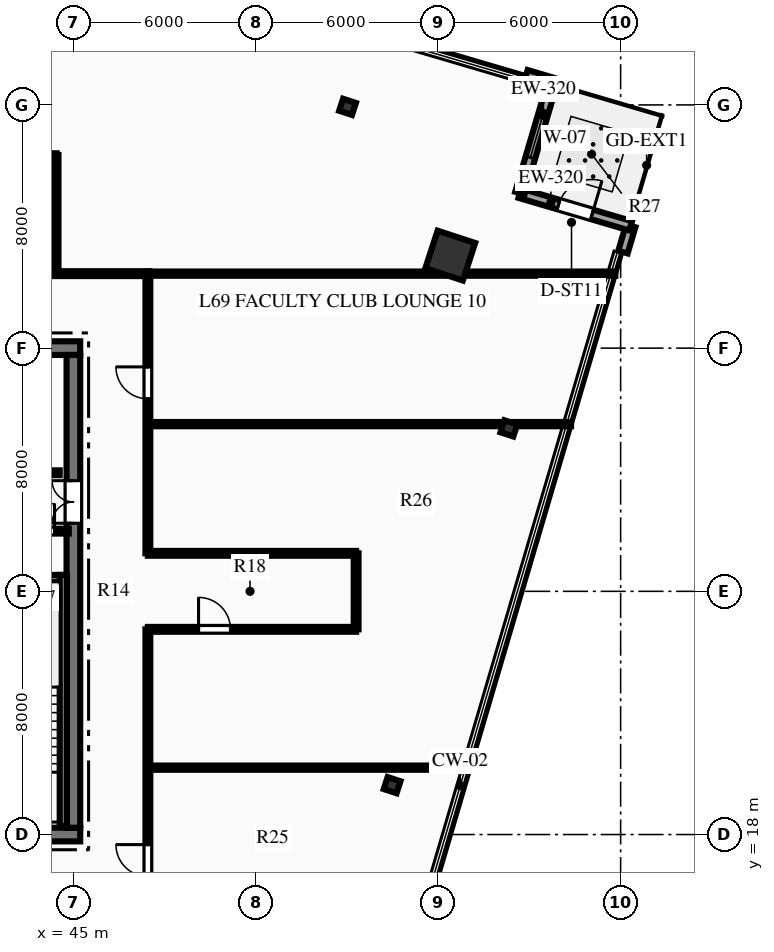
"""IFC4 building model, lengths in metres.
Left out: names, types, materials, properties, quantities, classifications, styles, units other than length and angle.
Written with IfcOpenShell. Run it as: python <this file> out.ifc"""

import sys

from ifc_helpers import new_model, si_unit, direction, frame, frame_2d, origin, origin_2d, place, context, subcontext, project, spatial, rectangle, hollow_rectangle, i_section, extrude, element, fill, save


model = new_model("IFC4")
c1 = context("Model", 3, precision=1e-05, world=origin(), true_north=direction((0.0, 1.0)))
c2 = subcontext(c1, "Body", "Model", "MODEL_VIEW")
j1 = project(units=[si_unit("LENGTHUNIT", "METRE"), si_unit("PLANEANGLEUNIT", "RADIAN")], contexts=[c1])
p1 = place(None, origin())
s1 = spatial("IfcSite", under=j1, at=p1, CompositionType="ELEMENT")
p2 = place(p1, origin())
s2 = spatial("IfcBuilding", under=s1, at=p2, CompositionType="ELEMENT")
p3 = place(p2, frame((0.0, 0.0, 274.95)))
s3 = spatial("IfcBuildingStorey", under=s2, at=p3, CompositionType="ELEMENT", Elevation=274.95)
p4 = place(p3, frame((26.775, 18.0, 0.0), z_axis=(0.0, 0.0, 1.0), x_axis=(1.0, 0.0, 0.0)))
e1 = element("IfcWall", 1, at=p4, inside=s3, PredefinedType="SHEAR", context=c2, shape_type="SweptSolid", body=[
    extrude(rectangle(XDim=18.45, YDim=0.45, at=frame_2d((9.225, 0.0))), origin(), (0.0, 0.0, 1.0), 3.75),
])
p5 = place(p4, frame((7.325, 0.0, 0.0)))
e2 = element("IfcOpeningElement", 2, at=p5, cuts=e1, PredefinedType="OPENING", context=c2, shape_type="SweptSolid", body=[
    extrude(rectangle(XDim=1.1, YDim=2.15, at=frame_2d((0.55, 1.075))), frame((0.0, 0.235, 0.0), z_axis=(0.0, -1.0, 0.0), x_axis=(1.0, 0.0, 0.0)), (0.0, 0.0, 1.0), 0.47),
])
p6 = place(p4, frame((10.025, 0.0, 0.0)))
e3 = element("IfcOpeningElement", 3, at=p6, cuts=e1, PredefinedType="OPENING", context=c2, shape_type="SweptSolid", body=[
    extrude(rectangle(XDim=1.1, YDim=2.15, at=frame_2d((0.55, 1.075))), frame((0.0, 0.235, 0.0), z_axis=(0.0, -1.0, 0.0), x_axis=(1.0, 0.0, 0.0)), (0.0, 0.0, 1.0), 0.47),
])
p7 = place(p3, frame((26.775, 34.0, 0.0), z_axis=(0.0, 0.0, 1.0), x_axis=(1.0, 0.0, 0.0)))
e4 = element("IfcWall", 4, at=p7, inside=s3, PredefinedType="SHEAR", context=c2, shape_type="SweptSolid", body=[
    extrude(rectangle(XDim=18.45, YDim=0.45, at=frame_2d((9.225, 0.0))), origin(), (0.0, 0.0, 1.0), 3.75),
])
p8 = place(p3, frame((45.0, 18.225, 0.0), z_axis=(0.0, 0.0, 1.0), x_axis=(0.0, 1.0, 0.0)))
e5 = element("IfcWall", 5, at=p8, inside=s3, PredefinedType="SHEAR", context=c2, shape_type="SweptSolid", body=[
    extrude(rectangle(XDim=15.55, YDim=0.45, at=frame_2d((7.775, 0.0))), origin(), (0.0, 0.0, 1.0), 3.75),
])
p9 = place(p8, frame((10.015, 0.0, 0.0)))
e6 = element("IfcOpeningElement", 6, at=p9, cuts=e5, PredefinedType="OPENING", context=c2, shape_type="SweptSolid", body=[
    extrude(rectangle(XDim=1.4, YDim=2.2, at=frame_2d((0.7, 1.1))), frame((0.0, 0.235, 0.0), z_axis=(0.0, -1.0, 0.0), x_axis=(1.0, 0.0, 0.0)), (0.0, 0.0, 1.0), 0.47),
])
p10 = place(p3, frame((40.81, 26.42, 0.0), z_axis=(0.0, 0.0, 1.0), x_axis=(1.0, 0.0, 0.0)))
e7 = element("IfcWall", 7, at=p10, inside=s3, PredefinedType="SHEAR", context=c2, shape_type="SweptSolid", body=[
    extrude(rectangle(XDim=3.98, YDim=0.24, at=frame_2d((1.99, 0.0))), origin(), (0.0, 0.0, 1.0), 3.75),
])
p11 = place(p3, frame((44.67, 18.28, 0.0), z_axis=(0.0, 0.0, 1.0), x_axis=(0.0, 1.0, 0.0)))
e8 = element("IfcWall", 8, at=p11, inside=s3, PredefinedType="SHEAR", context=c2, shape_type="SweptSolid", body=[
    extrude(rectangle(XDim=8.26, YDim=0.24, at=frame_2d((4.13, 0.0))), origin(), (0.0, 0.0, 1.0), 3.75),
])
p12 = place(p3, frame((57.396, 37.043, 0.0), z_axis=(0.0, 0.0, 1.0), x_axis=(0.311008203279, 0.950407227189, 0.0)))
e9 = element("IfcColumn", 9, at=p12, inside=s3, PredefinedType="COLUMN", context=c2, shape_type="SweptSolid", body=[
    extrude(hollow_rectangle(XDim=1.3, YDim=1.3, WallThickness=0.06, at=origin_2d()), origin(), (0.0, 0.0, 1.0), 3.75),
])
for number, where, z_axis, x_axis in (
    (10, (55.483, 19.624, 0.0), (0.0, 0.0, 1.0), (0.311, 0.95, 0.0)),
    (11, (59.324, 31.36, 0.0), (0.0, 0.0, 1.0), (0.311, 0.95, 0.0)),
    (12, (54.018, 41.937, 0.0), (0.0, 0.0, 1.0), (0.311, 0.95, 0.0)),
):
    element("IfcColumn", number, at=place(p3, frame(where, z_axis=z_axis, x_axis=x_axis)), inside=s3, PredefinedType="COLUMN", context=c2, shape_type="SweptSolid", body=[
        extrude(i_section(OverallWidth=0.416, OverallDepth=0.445, WebThickness=0.039, FlangeThickness=0.063, at=origin_2d()), origin(), (0.0, 0.0, 1.0), 3.75),
    ])
p13 = place(p3, frame((63.331, 38.022, 0.0), z_axis=(0.0, 0.0, 1.0), x_axis=(-0.282092897466, -0.959387094555, 0.0)))
e13 = element("IfcWall", 13, at=p13, inside=s3, PredefinedType="STANDARD", context=c2, shape_type="SweptSolid", body=[
    extrude(rectangle(XDim=0.9, YDim=0.32, at=frame_2d((0.45, 0.0))), origin(), (0.0, 0.0, 1.0), 3.48),
])
p14 = place(p3, frame((59.686, 39.095, 0.0), z_axis=(0.0, 0.0, 1.0), x_axis=(0.959321496859, -0.282315896939, 0.0)))
e14 = element("IfcWall", 14, at=p14, inside=s3, PredefinedType="STANDARD", context=c2, shape_type="SweptSolid", body=[
    extrude(rectangle(XDim=3.8, YDim=0.32, at=frame_2d((1.9, 0.0))), origin(), (0.0, 0.0, 1.0), 3.48),
])
p15 = place(p14, frame((1.325, 0.0, 0.0)))
e15 = element("IfcOpeningElement", 15, at=p15, cuts=e14, PredefinedType="OPENING", context=c2, shape_type="SweptSolid", body=[
    extrude(rectangle(XDim=1.15, YDim=2.2, at=frame_2d((0.575, 1.1))), frame((0.0, 0.17, 0.0), z_axis=(0.0, -1.0, 0.0), x_axis=(1.0, 0.0, 0.0)), (0.0, 0.0, 1.0), 0.34),
])
p16 = place(p3, frame((60.759, 42.74, 0.0), z_axis=(0.0, 0.0, 1.0), x_axis=(-0.282315896939, -0.959321496859, 0.0)))
e16 = element("IfcWall", 16, at=p16, inside=s3, PredefinedType="STANDARD", context=c2, shape_type="SweptSolid", body=[
    extrude(rectangle(XDim=3.8, YDim=0.32, at=frame_2d((1.9, 0.0))), origin(), (0.0, 0.0, 1.0), 3.48),
])
p17 = place(p16, frame((1.225, 0.0, 0.85)))
e17 = element("IfcOpeningElement", 17, at=p17, cuts=e16, PredefinedType="OPENING", context=c2, shape_type="SweptSolid", body=[
    extrude(rectangle(XDim=1.35, YDim=1.95, at=frame_2d((0.675, 0.975))), frame((0.0, 0.17, 0.0), z_axis=(0.0, -1.0, 0.0), x_axis=(1.0, 0.0, 0.0)), (0.0, 0.0, 1.0), 0.34),
])
p18 = place(p3, frame((59.896, 42.995, 0.0), z_axis=(0.0, 0.0, 1.0), x_axis=(0.959292029891, -0.282416007669, 0.0)))
e18 = element("IfcWall", 18, at=p18, inside=s3, PredefinedType="STANDARD", context=c2, shape_type="SweptSolid", body=[
    extrude(rectangle(XDim=0.9, YDim=0.32, at=frame_2d((0.45, 0.0))), origin(), (0.0, 0.0, 1.0), 3.48),
])
p19 = place(p3, frame((40.8, 27.98, 0.0), z_axis=(0.0, 0.0, 1.0), x_axis=(1.0, 0.0, 0.0)))
e19 = element("IfcWall", 19, at=p19, inside=s3, PredefinedType="PARTITIONING", context=c2, shape_type="SweptSolid", body=[
    extrude(rectangle(XDim=4.05, YDim=0.16, at=frame_2d((2.025, 0.0))), origin(), (0.0, 0.0, 1.0), 3.48),
])
p20 = place(p19, frame((0.77, 0.0, 0.0)))
e20 = element("IfcOpeningElement", 20, at=p20, cuts=e19, PredefinedType="OPENING", context=c2, shape_type="SweptSolid", body=[
    extrude(rectangle(XDim=0.9, YDim=2.15, at=frame_2d((0.45, 1.075))), frame((0.0, 0.09, 0.0), z_axis=(0.0, -1.0, 0.0), x_axis=(1.0, 0.0, 0.0)), (0.0, 0.0, 1.0), 0.18),
])
p21 = place(p19, frame((2.68, 0.0, 0.0)))
e21 = element("IfcOpeningElement", 21, at=p21, cuts=e19, PredefinedType="OPENING", context=c2, shape_type="SweptSolid", body=[
    extrude(rectangle(XDim=0.9, YDim=2.15, at=frame_2d((0.45, 1.075))), frame((0.0, 0.09, 0.0), z_axis=(0.0, -1.0, 0.0), x_axis=(1.0, 0.0, 0.0)), (0.0, 0.0, 1.0), 0.18),
])
p22 = place(p3, frame((40.12, 29.9, 0.0), z_axis=(0.0, 0.0, 1.0), x_axis=(1.0, 0.0, 0.0)))
e22 = element("IfcWall", 22, at=p22, inside=s3, PredefinedType="PARTITIONING", context=c2, shape_type="SweptSolid", body=[
    extrude(rectangle(XDim=4.43, YDim=0.16, at=frame_2d((2.215, 0.0))), origin(), (0.0, 0.0, 1.0), 3.48),
])
p23 = place(p22, frame((1.755, 0.0, 0.0)))
e23 = element("IfcOpeningElement", 23, at=p23, cuts=e22, PredefinedType="OPENING", context=c2, shape_type="SweptSolid", body=[
    extrude(rectangle(XDim=0.95, YDim=2.15, at=frame_2d((0.475, 1.075))), frame((0.0, 0.09, 0.0), z_axis=(0.0, -1.0, 0.0), x_axis=(1.0, 0.0, 0.0)), (0.0, 0.0, 1.0), 0.18),
])
p24 = place(p3, frame((37.25, 36.45, 0.0), z_axis=(0.0, 0.0, 1.0), x_axis=(1.0, 0.0, 0.0)))
e24 = element("IfcWall", 24, at=p24, inside=s3, PredefinedType="PARTITIONING", context=c2, shape_type="SweptSolid", body=[
    extrude(rectangle(XDim=10.25, YDim=0.16, at=frame_2d((5.125, 0.0))), origin(), (0.0, 0.0, 1.0), 3.48),
])
p25 = place(p24, frame((1.0, 0.0, 0.0)))
e25 = element("IfcOpeningElement", 25, at=p25, cuts=e24, PredefinedType="OPENING", context=c2, shape_type="SweptSolid", body=[
    extrude(rectangle(XDim=0.9, YDim=2.15, at=frame_2d((0.45, 1.075))), frame((0.0, 0.09, 0.0), z_axis=(0.0, -1.0, 0.0), x_axis=(1.0, 0.0, 0.0)), (0.0, 0.0, 1.0), 0.18),
])
p26 = place(p24, frame((3.3, 0.0, 0.0)))
e26 = element("IfcOpeningElement", 26, at=p26, cuts=e24, PredefinedType="OPENING", context=c2, shape_type="SweptSolid", body=[
    extrude(rectangle(XDim=0.9, YDim=2.15, at=frame_2d((0.45, 1.075))), frame((0.0, 0.09, 0.0), z_axis=(0.0, -1.0, 0.0), x_axis=(1.0, 0.0, 0.0)), (0.0, 0.0, 1.0), 0.18),
])
p27 = place(p24, frame((5.55, 0.0, 0.0)))
e27 = element("IfcOpeningElement", 27, at=p27, cuts=e24, PredefinedType="OPENING", context=c2, shape_type="SweptSolid", body=[
    extrude(rectangle(XDim=1.0, YDim=2.15, at=frame_2d((0.5, 1.075))), frame((0.0, 0.09, 0.0), z_axis=(0.0, -1.0, 0.0), x_axis=(1.0, 0.0, 0.0)), (0.0, 0.0, 1.0), 0.18),
])
p28 = place(p3, frame((47.45, 15.55, 0.0), z_axis=(0.0, 0.0, 1.0), x_axis=(0.0, 1.0, 0.0)))
e28 = element("IfcWall", 28, at=p28, inside=s3, PredefinedType="PARTITIONING", context=c2, shape_type="SweptSolid", body=[
    extrude(rectangle(XDim=9.2, YDim=0.16, at=frame_2d((4.6, 0.0))), origin(), (0.0, 0.0, 1.0), 3.48),
])
p29 = place(p28, frame((1.069, 0.0, 0.0)))
e29 = element("IfcOpeningElement", 29, at=p29, cuts=e28, PredefinedType="OPENING", context=c2, shape_type="SweptSolid", body=[
    extrude(rectangle(XDim=1.05, YDim=2.15, at=frame_2d((0.525, 1.075))), frame((0.0, 0.09, 0.0), z_axis=(0.0, -1.0, 0.0), x_axis=(1.0, 0.0, 0.0)), (0.0, 0.0, 1.0), 0.18),
])
p30 = place(p3, frame((47.45, 27.25, 0.0), z_axis=(0.0, 0.0, 1.0), x_axis=(0.0, 1.0, 0.0)))
e30 = element("IfcWall", 30, at=p30, inside=s3, PredefinedType="PARTITIONING", context=c2, shape_type="SweptSolid", body=[
    extrude(rectangle(XDim=9.2, YDim=0.16, at=frame_2d((4.6, 0.0))), origin(), (0.0, 0.0, 1.0), 3.48),
])
p31 = place(p30, frame((5.083, 0.0, 0.0)))
e31 = element("IfcOpeningElement", 31, at=p31, cuts=e30, PredefinedType="OPENING", context=c2, shape_type="SweptSolid", body=[
    extrude(rectangle(XDim=1.05, YDim=2.15, at=frame_2d((0.525, 1.075))), frame((0.0, 0.09, 0.0), z_axis=(0.0, -1.0, 0.0), x_axis=(1.0, 0.0, 0.0)), (0.0, 0.0, 1.0), 0.18),
])
p32 = place(p3, frame((47.45, 24.75, 0.0), z_axis=(0.0, 0.0, 1.0), x_axis=(1.0, 0.0, 0.0)))
e32 = element("IfcWall", 32, at=p32, inside=s3, PredefinedType="PARTITIONING", context=c2, shape_type="SweptSolid", body=[
    extrude(rectangle(XDim=6.85, YDim=0.16, at=frame_2d((3.425, 0.0))), origin(), (0.0, 0.0, 1.0), 3.48),
])
p33 = place(p32, frame((1.667, 0.0, 0.0)))
e33 = element("IfcOpeningElement", 33, at=p33, cuts=e32, PredefinedType="OPENING", context=c2, shape_type="SweptSolid", body=[
    extrude(rectangle(XDim=1.05, YDim=2.15, at=frame_2d((0.525, 1.075))), frame((0.0, 0.09, 0.0), z_axis=(0.0, -1.0, 0.0), x_axis=(1.0, 0.0, 0.0)), (0.0, 0.0, 1.0), 0.18),
])
p34 = place(p3, frame((47.45, 27.25, 0.0), z_axis=(0.0, 0.0, 1.0), x_axis=(1.0, 0.0, 0.0)))
e34 = element("IfcWall", 34, at=p34, inside=s3, PredefinedType="PARTITIONING", context=c2, shape_type="SweptSolid", body=[
    extrude(rectangle(XDim=6.85, YDim=0.16, at=frame_2d((3.425, 0.0))), origin(), (0.0, 0.0, 1.0), 3.48),
])
p35 = place(p3, frame((54.3, 24.75, 0.0), z_axis=(0.0, 0.0, 1.0), x_axis=(0.0, 1.0, 0.0)))
e35 = element("IfcWall", 35, at=p35, inside=s3, PredefinedType="PARTITIONING", context=c2, shape_type="SweptSolid", body=[
    extrude(rectangle(XDim=2.5, YDim=0.16, at=frame_2d((1.25, 0.0))), origin(), (0.0, 0.0, 1.0), 3.48),
])
p36 = place(p3, frame((44.45, 36.45, 0.0), z_axis=(0.0, 0.0, 1.0), x_axis=(0.0, 1.0, 0.0)))
e36 = element("IfcWall", 36, at=p36, inside=s3, PredefinedType="PARTITIONING", context=c2, shape_type="SweptSolid", body=[
    extrude(rectangle(XDim=3.9, YDim=0.12, at=frame_2d((1.95, 0.0))), origin(), (0.0, 0.0, 1.0), 3.48),
])
p37 = place(p3, frame((37.55, 40.35, 0.0), z_axis=(0.0, 0.0, 1.0), x_axis=(1.0, 0.0, 0.0)))
e37 = element("IfcWall", 37, at=p37, inside=s3, PredefinedType="PARTITIONING", context=c2, shape_type="SweptSolid", body=[
    extrude(rectangle(XDim=6.9, YDim=0.12, at=frame_2d((3.45, 0.0))), origin(), (0.0, 0.0, 1.0), 3.48),
])
p38 = place(p3, frame((47.45, 36.45, 0.0), z_axis=(0.0, 0.0, 1.0), x_axis=(1.0, 0.0, 0.0)))
e38 = element("IfcWall", 38, at=p38, inside=s3, PredefinedType="PARTITIONING", context=c2, shape_type="SweptSolid", body=[
    extrude(rectangle(XDim=15.377, YDim=0.14, at=frame_2d((7.688, 0.0))), origin(), (0.0, 0.0, 1.0), 2.858),
])
p39 = place(p3, frame((47.45, 20.2, 0.0), z_axis=(0.0, 0.0, 1.0), x_axis=(1.0, 0.0, 0.0)))
e39 = element("IfcWall", 39, at=p39, inside=s3, PredefinedType="PARTITIONING", context=c2, shape_type="SweptSolid", body=[
    extrude(rectangle(XDim=10.594, YDim=0.14, at=frame_2d((5.297, 0.0))), origin(), (0.0, 0.0, 1.0), 3.48),
])
p40 = place(p3, frame((47.45, 31.5, 0.0), z_axis=(0.0, 0.0, 1.0), x_axis=(1.0, 0.0, 0.0)))
e40 = element("IfcWall", 40, at=p40, inside=s3, PredefinedType="PARTITIONING", context=c2, shape_type="SweptSolid", body=[
    extrude(rectangle(XDim=13.92, YDim=0.14, at=frame_2d((6.96, 0.0))), origin(), (0.0, 0.0, 1.0), 2.858),
])
p41 = place(p15, origin())
e41 = element("IfcDoor", 41, at=p41, inside=s3, OperationType="SINGLE_SWING_RIGHT", PredefinedType="DOOR", context=c2, shape_type="SweptSolid", body=[
    extrude(rectangle(XDim=1.15, YDim=2.2, at=frame_2d((0.575, 1.1))), frame((0.0, 0.025, 0.0), z_axis=(0.0, -1.0, 0.0), x_axis=(1.0, 0.0, 0.0)), (0.0, 0.0, 1.0), 0.05),
])
fill(e15, e41)
p42 = place(p17, origin())
e42 = element("IfcWindow", 42, at=p42, inside=s3, PartitioningType="SINGLE_PANEL", PredefinedType="WINDOW", context=c2, shape_type="SweptSolid", body=[
    extrude(rectangle(XDim=1.35, YDim=1.95, at=frame_2d((0.675, 0.975))), frame((0.0, 0.03, 0.0), z_axis=(0.0, -1.0, 0.0), x_axis=(1.0, 0.0, 0.0)), (0.0, 0.0, 1.0), 0.06),
])
fill(e17, e42)
p43 = place(p21, origin())
e43 = element("IfcDoor", 43, at=p43, inside=s3, OperationType="SINGLE_SWING_RIGHT", PredefinedType="DOOR", context=c2, shape_type="SweptSolid", body=[
    extrude(rectangle(XDim=0.9, YDim=2.15, at=frame_2d((0.45, 1.075))), frame((0.0, 0.025, 0.0), z_axis=(0.0, -1.0, 0.0), x_axis=(1.0, 0.0, 0.0)), (0.0, 0.0, 1.0), 0.05),
])
fill(e21, e43)
p44 = place(p9, origin())
e44 = element("IfcDoor", 44, at=p44, inside=s3, OperationType="DOUBLE_DOOR_SINGLE_SWING", PredefinedType="DOOR", context=c2, shape_type="SweptSolid", body=[
    extrude(rectangle(XDim=1.4, YDim=2.2, at=frame_2d((0.7, 1.1))), frame((0.0, 0.025, 0.0), z_axis=(0.0, -1.0, 0.0), x_axis=(1.0, 0.0, 0.0)), (0.0, 0.0, 1.0), 0.05),
])
fill(e6, e44)
p45 = place(p29, origin())
e45 = element("IfcDoor", 45, at=p45, inside=s3, OperationType="SINGLE_SWING_RIGHT", PredefinedType="DOOR", context=c2, shape_type="SweptSolid", body=[
    extrude(rectangle(XDim=1.05, YDim=2.15, at=frame_2d((0.525, 1.075))), frame((0.0, 0.025, 0.0), z_axis=(0.0, -1.0, 0.0), x_axis=(1.0, 0.0, 0.0)), (0.0, 0.0, 1.0), 0.05),
])
fill(e29, e45)
p46 = place(p33, origin())
e46 = element("IfcDoor", 46, at=p46, inside=s3, OperationType="SINGLE_SWING_LEFT", PredefinedType="DOOR", context=c2, shape_type="SweptSolid", body=[
    extrude(rectangle(XDim=1.05, YDim=2.15, at=frame_2d((0.525, 1.075))), frame((0.0, 0.025, 0.0), z_axis=(0.0, -1.0, 0.0), x_axis=(1.0, 0.0, 0.0)), (0.0, 0.0, 1.0), 0.05),
])
fill(e33, e46)
p47 = place(p31, origin())
e47 = element("IfcDoor", 47, at=p47, inside=s3, OperationType="SINGLE_SWING_RIGHT", PredefinedType="DOOR", context=c2, shape_type="SweptSolid", body=[
    extrude(rectangle(XDim=1.05, YDim=2.15, at=frame_2d((0.525, 1.075))), frame((0.0, 0.025, 0.0), z_axis=(0.0, -1.0, 0.0), x_axis=(1.0, 0.0, 0.0)), (0.0, 0.0, 1.0), 0.05),
])
fill(e31, e47)
save(model, sys.argv[1])
